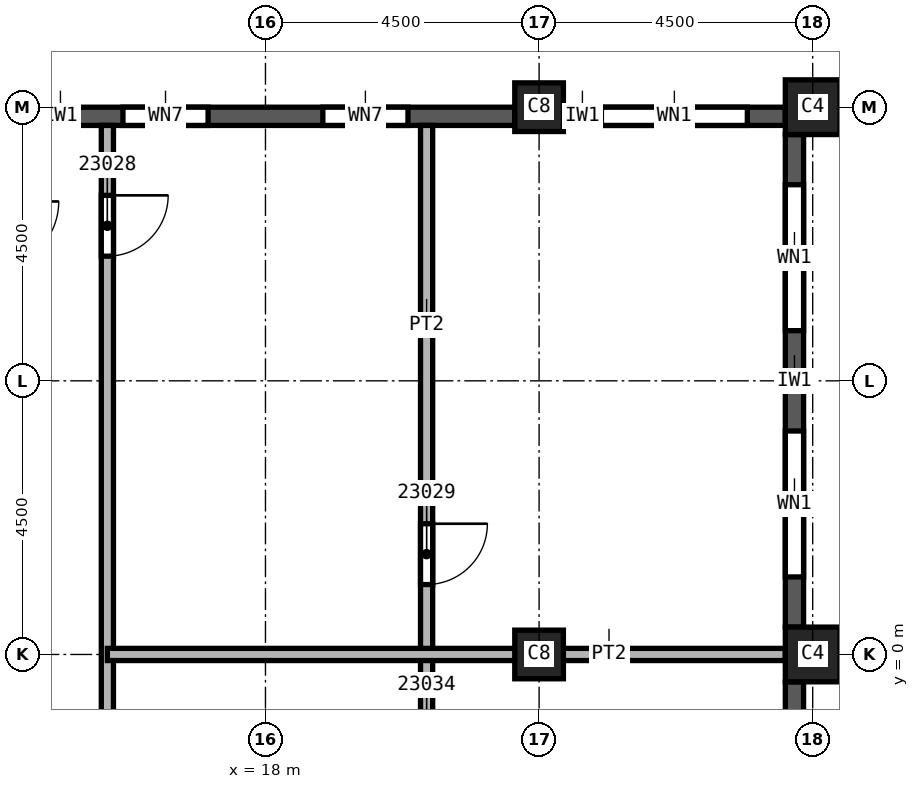
"""IFC4 building model, lengths in metres.
Left out: names, types, materials, properties, quantities, classifications, styles, units other than length and angle.
Written with IfcOpenShell. Run it as: python <this file> out.ifc"""

import sys

from ifc_helpers import new_model, si_unit, direction, frame, frame_2d, origin, origin_2d, place, context, subcontext, project, spatial, rectangle, extrude, element, fill, save


model = new_model("IFC4")
c1 = context("Model", 3, precision=1e-05, world=origin(), true_north=direction((0.0, 1.0)))
c2 = subcontext(c1, "Body", "Model", "MODEL_VIEW")
j1 = project(units=[si_unit("LENGTHUNIT", "METRE"), si_unit("PLANEANGLEUNIT", "RADIAN")], contexts=[c1])
p1 = place(None, origin())
s1 = spatial("IfcSite", under=j1, at=p1, CompositionType="ELEMENT")
p2 = place(p1, origin())
s2 = spatial("IfcBuilding", under=s1, at=p2, CompositionType="ELEMENT")
p3 = place(p2, frame((0.0, 0.0, 326.0)))
s3 = spatial("IfcBuildingStorey", under=s2, at=p3, CompositionType="ELEMENT", Elevation=326.0)
for number, where, z_axis, x_axis in (
    (1, (22.5, 0.0, 0.0), (0.0, 0.0, 1.0), (1.0, 0.0, 0.0)),
    (2, (22.5, 9.0, 0.0), (0.0, 0.0, 1.0), (1.0, 0.0, 0.0)),
):
    element("IfcColumn", number, at=place(p3, frame(where, z_axis=z_axis, x_axis=x_axis)), inside=s3, PredefinedType="COLUMN", context=c2, shape_type="SweptSolid", body=[
        extrude(rectangle(XDim=0.8, YDim=0.8, at=origin_2d()), origin(), (0.0, 0.0, 1.0), 3.74),
    ])
for number, where, z_axis, x_axis in (
    (3, (27.0, 0.0, 0.0), (0.0, 0.0, 1.0), (0.0, 1.0, 0.0)),
    (4, (27.0, 9.0, 0.0), (0.0, 0.0, 1.0), (0.0, 1.0, 0.0)),
):
    element("IfcColumn", number, at=place(p3, frame(where, z_axis=z_axis, x_axis=x_axis)), inside=s3, PredefinedType="COLUMN", context=c2, shape_type="SweptSolid", body=[
        extrude(rectangle(XDim=0.9, YDim=0.9, at=origin_2d()), origin(), (0.0, 0.0, 1.0), 3.74),
    ])
p4 = place(p3, frame((26.7, -8.55, 0.0), z_axis=(0.0, 0.0, 1.0), x_axis=(0.0, 1.0, 0.0)))
e5 = element("IfcWall", 5, at=p4, inside=s3, PredefinedType="SOLIDWALL", context=c2, shape_type="SweptSolid", body=[
    extrude(rectangle(XDim=8.1, YDim=0.3, at=frame_2d((4.05, 0.0))), origin(), (0.0, 0.0, 1.0), 3.14),
])
p5 = place(p4, frame((4.875, 0.0, 0.8)))
e6 = element("IfcOpeningElement", 6, at=p5, cuts=e5, PredefinedType="OPENING", context=c2, shape_type="SweptSolid", body=[
    extrude(rectangle(XDim=2.4, YDim=1.95, at=frame_2d((1.2, 0.975))), frame((0.0, 0.15, 0.0), z_axis=(0.0, -1.0, 0.0), x_axis=(1.0, 0.0, 0.0)), (0.0, 0.0, 1.0), 0.3),
])
p6 = place(p4, frame((0.913, 0.0, 0.8)))
e7 = element("IfcOpeningElement", 7, at=p6, cuts=e5, PredefinedType="OPENING", context=c2, shape_type="SweptSolid", body=[
    extrude(rectangle(XDim=0.6, YDim=1.95, at=frame_2d((0.3, 0.975))), frame((0.0, 0.15, 0.0), z_axis=(0.0, -1.0, 0.0), x_axis=(1.0, 0.0, 0.0)), (0.0, 0.0, 1.0), 0.3),
])
p7 = place(p4, frame((2.113, 0.0, 0.8)))
e8 = element("IfcOpeningElement", 8, at=p7, cuts=e5, PredefinedType="OPENING", context=c2, shape_type="SweptSolid", body=[
    extrude(rectangle(XDim=1.0, YDim=1.95, at=frame_2d((0.5, 0.975))), frame((0.0, 0.15, 0.0), z_axis=(0.0, -1.0, 0.0), x_axis=(1.0, 0.0, 0.0)), (0.0, 0.0, 1.0), 0.3),
])
p8 = place(p3, frame((26.7, 0.45, 0.0), z_axis=(0.0, 0.0, 1.0), x_axis=(0.0, 1.0, 0.0)))
e9 = element("IfcWall", 9, at=p8, inside=s3, PredefinedType="SOLIDWALL", context=c2, shape_type="SweptSolid", body=[
    extrude(rectangle(XDim=8.1, YDim=0.3, at=frame_2d((4.05, 0.0))), origin(), (0.0, 0.0, 1.0), 3.14),
])
p9 = place(p8, frame((0.825, 0.0, 0.8)))
e10 = element("IfcOpeningElement", 10, at=p9, cuts=e9, PredefinedType="OPENING", context=c2, shape_type="SweptSolid", body=[
    extrude(rectangle(XDim=2.4, YDim=1.95, at=frame_2d((1.2, 0.975))), frame((0.0, 0.15, 0.0), z_axis=(0.0, -1.0, 0.0), x_axis=(1.0, 0.0, 0.0)), (0.0, 0.0, 1.0), 0.3),
])
p10 = place(p8, frame((4.875, 0.0, 0.8)))
e11 = element("IfcOpeningElement", 11, at=p10, cuts=e9, PredefinedType="OPENING", context=c2, shape_type="SweptSolid", body=[
    extrude(rectangle(XDim=2.4, YDim=1.95, at=frame_2d((1.2, 0.975))), frame((0.0, 0.15, 0.0), z_axis=(0.0, -1.0, 0.0), x_axis=(1.0, 0.0, 0.0)), (0.0, 0.0, 1.0), 0.3),
])
p11 = place(p3, frame((22.1, 8.85, 0.0), z_axis=(0.0, 0.0, 1.0), x_axis=(-1.0, 0.0, 0.0)))
e12 = element("IfcWall", 12, at=p11, inside=s3, PredefinedType="SOLIDWALL", context=c2, shape_type="SweptSolid", body=[
    extrude(rectangle(XDim=8.55, YDim=0.3, at=frame_2d((4.275, 0.0))), origin(), (0.0, 0.0, 1.0), 3.14),
])
p12 = place(p11, frame((1.756, 0.0, 0.8)))
e13 = element("IfcOpeningElement", 13, at=p12, cuts=e12, PredefinedType="OPENING", context=c2, shape_type="SweptSolid", body=[
    extrude(rectangle(XDim=1.4, YDim=1.95, at=frame_2d((0.7, 0.975))), frame((0.0, 0.15, 0.0), z_axis=(0.0, -1.0, 0.0), x_axis=(1.0, 0.0, 0.0)), (0.0, 0.0, 1.0), 0.3),
])
p13 = place(p11, frame((5.044, 0.0, 0.8)))
e14 = element("IfcOpeningElement", 14, at=p13, cuts=e12, PredefinedType="OPENING", context=c2, shape_type="SweptSolid", body=[
    extrude(rectangle(XDim=1.4, YDim=1.95, at=frame_2d((0.7, 0.975))), frame((0.0, 0.15, 0.0), z_axis=(0.0, -1.0, 0.0), x_axis=(1.0, 0.0, 0.0)), (0.0, 0.0, 1.0), 0.3),
])
p14 = place(p3, frame((26.55, 8.85, 0.0), z_axis=(0.0, 0.0, 1.0), x_axis=(-1.0, 0.0, 0.0)))
e15 = element("IfcWall", 15, at=p14, inside=s3, PredefinedType="SOLIDWALL", context=c2, shape_type="SweptSolid", body=[
    extrude(rectangle(XDim=3.65, YDim=0.3, at=frame_2d((1.825, 0.0))), origin(), (0.0, 0.0, 1.0), 3.14),
])
p15 = place(p14, frame((0.625, 0.0, 0.8)))
e16 = element("IfcOpeningElement", 16, at=p15, cuts=e15, PredefinedType="OPENING", context=c2, shape_type="SweptSolid", body=[
    extrude(rectangle(XDim=2.4, YDim=1.95, at=frame_2d((1.2, 0.975))), frame((0.0, 0.15, 0.0), z_axis=(0.0, -1.0, 0.0), x_axis=(1.0, 0.0, 0.0)), (0.0, 0.0, 1.0), 0.3),
])
p16 = place(p3, frame((15.4, 8.7, 0.0), z_axis=(0.0, 0.0, 1.0), x_axis=(0.0, -1.0, 0.0)))
e17 = element("IfcWall", 17, at=p16, inside=s3, PredefinedType="PARTITIONING", context=c2, shape_type="SweptSolid", body=[
    extrude(rectangle(XDim=33.65, YDim=0.2, at=frame_2d((16.825, 0.0))), origin(), (0.0, 0.0, 1.0), 3.74),
])
p17 = place(p16, frame((1.15, 0.0, 0.0)))
e18 = element("IfcOpeningElement", 18, at=p17, cuts=e17, PredefinedType="OPENING", context=c2, shape_type="SweptSolid", body=[
    extrude(rectangle(XDim=1.0, YDim=2.1, at=frame_2d((0.5, 1.05))), frame((0.0, 0.1, 0.0), z_axis=(0.0, -1.0, 0.0), x_axis=(1.0, 0.0, 0.0)), (0.0, 0.0, 1.0), 0.2),
])
p18 = place(p16, frame((31.5, 0.0, 0.0)))
e19 = element("IfcOpeningElement", 19, at=p18, cuts=e17, PredefinedType="OPENING", context=c2, shape_type="SweptSolid", body=[
    extrude(rectangle(XDim=1.0, YDim=2.1, at=frame_2d((0.5, 1.05))), frame((0.0, 0.1, 0.0), z_axis=(0.0, -1.0, 0.0), x_axis=(1.0, 0.0, 0.0)), (0.0, 0.0, 1.0), 0.2),
])
p19 = place(p16, frame((21.45, 0.0, 0.0)))
e20 = element("IfcOpeningElement", 20, at=p19, cuts=e17, PredefinedType="OPENING", context=c2, shape_type="SweptSolid", body=[
    extrude(rectangle(XDim=1.0, YDim=2.1, at=frame_2d((0.5, 1.05))), frame((0.0, 0.1, 0.0), z_axis=(0.0, -1.0, 0.0), x_axis=(1.0, 0.0, 0.0)), (0.0, 0.0, 1.0), 0.2),
])
p20 = place(p16, frame((10.65, 0.0, 0.0)))
e21 = element("IfcOpeningElement", 21, at=p20, cuts=e17, PredefinedType="OPENING", context=c2, shape_type="SweptSolid", body=[
    extrude(rectangle(XDim=1.0, YDim=2.1, at=frame_2d((0.5, 1.05))), frame((0.0, 0.1, 0.0), z_axis=(0.0, -1.0, 0.0), x_axis=(1.0, 0.0, 0.0)), (0.0, 0.0, 1.0), 0.2),
])
p21 = place(p3, frame((20.65, 8.7, 0.0), z_axis=(0.0, 0.0, 1.0), x_axis=(0.0, -1.0, 0.0)))
e22 = element("IfcWall", 22, at=p21, inside=s3, PredefinedType="PARTITIONING", context=c2, shape_type="SweptSolid", body=[
    extrude(rectangle(XDim=15.45, YDim=0.2, at=frame_2d((7.725, 0.0))), origin(), (0.0, 0.0, 1.0), 3.74),
])
p22 = place(p21, frame((6.55, 0.0, 0.0)))
e23 = element("IfcOpeningElement", 23, at=p22, cuts=e22, PredefinedType="OPENING", context=c2, shape_type="SweptSolid", body=[
    extrude(rectangle(XDim=1.0, YDim=2.1, at=frame_2d((0.5, 1.05))), frame((0.0, 0.1, 0.0), z_axis=(0.0, -1.0, 0.0), x_axis=(1.0, 0.0, 0.0)), (0.0, 0.0, 1.0), 0.2),
])
p23 = place(p21, frame((9.7, 0.0, 0.0)))
e24 = element("IfcOpeningElement", 24, at=p23, cuts=e22, PredefinedType="OPENING", context=c2, shape_type="SweptSolid", body=[
    extrude(rectangle(XDim=1.0, YDim=2.1, at=frame_2d((0.5, 1.05))), frame((0.0, 0.1, 0.0), z_axis=(0.0, -1.0, 0.0), x_axis=(1.0, 0.0, 0.0)), (0.0, 0.0, 1.0), 0.2),
])
p24 = place(p3, frame((26.55, 0.0, 0.0), z_axis=(0.0, 0.0, 1.0), x_axis=(-1.0, 0.0, 0.0)))
e25 = element("IfcWall", 25, at=p24, inside=s3, PredefinedType="PARTITIONING", context=c2, shape_type="SweptSolid", body=[
    extrude(rectangle(XDim=11.15, YDim=0.2, at=frame_2d((5.575, 0.0))), origin(), (0.0, 0.0, 1.0), 3.74),
])
p25 = place(p9, origin())
e26 = element("IfcWindow", 26, at=p25, inside=s3, PartitioningType="SINGLE_PANEL", PredefinedType="WINDOW", context=c2, shape_type="SweptSolid", body=[
    extrude(rectangle(XDim=2.4, YDim=1.95, at=frame_2d((1.2, 0.975))), frame((0.0, 0.03, 0.0), z_axis=(0.0, -1.0, 0.0), x_axis=(1.0, 0.0, 0.0)), (0.0, 0.0, 1.0), 0.06),
])
fill(e10, e26)
p26 = place(p10, origin())
e27 = element("IfcWindow", 27, at=p26, inside=s3, PartitioningType="SINGLE_PANEL", PredefinedType="WINDOW", context=c2, shape_type="SweptSolid", body=[
    extrude(rectangle(XDim=2.4, YDim=1.95, at=frame_2d((1.2, 0.975))), frame((0.0, 0.03, 0.0), z_axis=(0.0, -1.0, 0.0), x_axis=(1.0, 0.0, 0.0)), (0.0, 0.0, 1.0), 0.06),
])
fill(e11, e27)
p27 = place(p15, origin())
e28 = element("IfcWindow", 28, at=p27, inside=s3, PartitioningType="SINGLE_PANEL", PredefinedType="WINDOW", context=c2, shape_type="SweptSolid", body=[
    extrude(rectangle(XDim=2.4, YDim=1.95, at=frame_2d((1.2, 0.975))), frame((0.0, 0.03, 0.0), z_axis=(0.0, -1.0, 0.0), x_axis=(1.0, 0.0, 0.0)), (0.0, 0.0, 1.0), 0.06),
])
fill(e16, e28)
p28 = place(p17, origin())
e29 = element("IfcDoor", 29, at=p28, inside=s3, OperationType="SINGLE_SWING_LEFT", PredefinedType="DOOR", context=c2, shape_type="SweptSolid", body=[
    extrude(rectangle(XDim=1.0, YDim=2.1, at=frame_2d((0.5, 1.05))), frame((0.0, 0.025, 0.0), z_axis=(0.0, -1.0, 0.0), x_axis=(1.0, 0.0, 0.0)), (0.0, 0.0, 1.0), 0.05),
])
fill(e18, e29)
p29 = place(p22, origin())
e30 = element("IfcDoor", 30, at=p29, inside=s3, OperationType="SINGLE_SWING_RIGHT", PredefinedType="DOOR", context=c2, shape_type="SweptSolid", body=[
    extrude(rectangle(XDim=1.0, YDim=2.1, at=frame_2d((0.5, 1.05))), frame((0.0, 0.025, 0.0), z_axis=(0.0, -1.0, 0.0), x_axis=(1.0, 0.0, 0.0)), (0.0, 0.0, 1.0), 0.05),
])
fill(e23, e30)
p30 = place(p12, origin())
e31 = element("IfcWindow", 31, at=p30, inside=s3, PartitioningType="SINGLE_PANEL", PredefinedType="WINDOW", context=c2, shape_type="SweptSolid", body=[
    extrude(rectangle(XDim=1.4, YDim=1.95, at=frame_2d((0.7, 0.975))), frame((0.0, 0.03, 0.0), z_axis=(0.0, -1.0, 0.0), x_axis=(1.0, 0.0, 0.0)), (0.0, 0.0, 1.0), 0.06),
])
fill(e13, e31)
p31 = place(p13, origin())
e32 = element("IfcWindow", 32, at=p31, inside=s3, PartitioningType="SINGLE_PANEL", PredefinedType="WINDOW", context=c2, shape_type="SweptSolid", body=[
    extrude(rectangle(XDim=1.4, YDim=1.95, at=frame_2d((0.7, 0.975))), frame((0.0, 0.03, 0.0), z_axis=(0.0, -1.0, 0.0), x_axis=(1.0, 0.0, 0.0)), (0.0, 0.0, 1.0), 0.06),
])
fill(e14, e32)
save(model, sys.argv[1])
